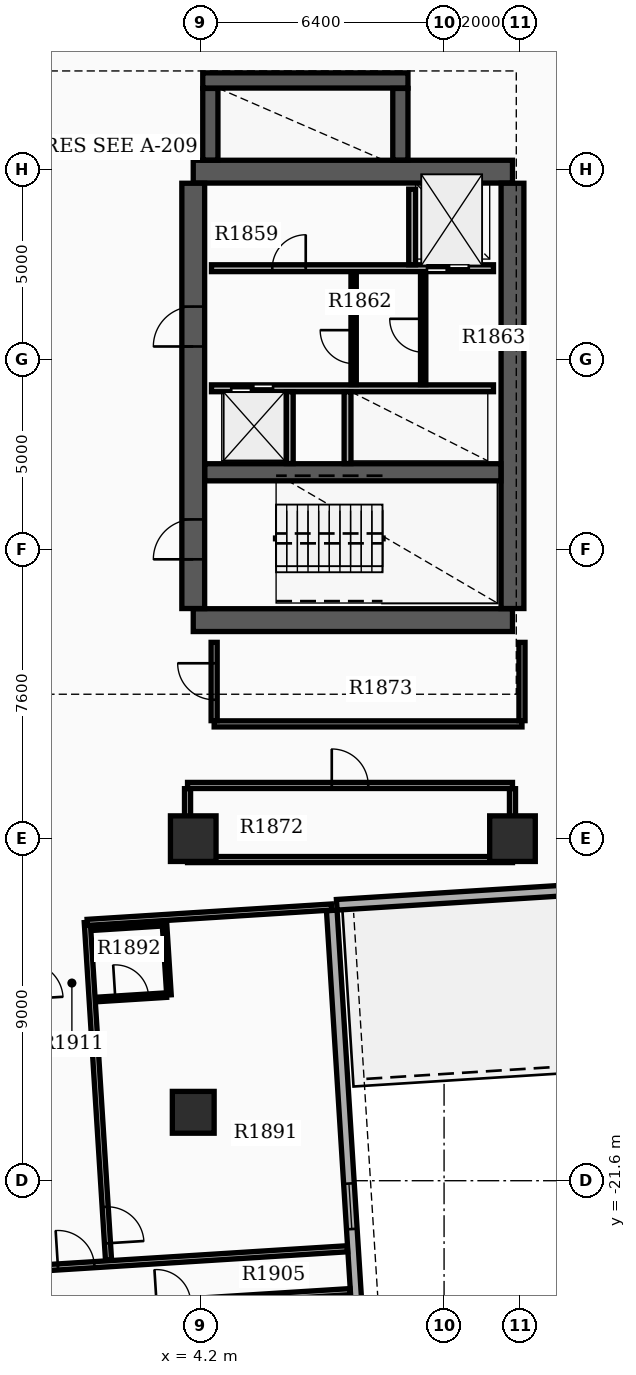
"""IFC4 building model, lengths in metres.
Left out: names, types, materials, properties, quantities, classifications, styles, units other than length and angle.
Written with IfcOpenShell. Run it as: python <this file> out.ifc"""

import sys

from ifc_helpers import new_model, si_unit, direction, frame, frame_2d, origin, origin_2d, place, context, subcontext, project, spatial, rectangle, extrude, element, fill, save


model = new_model("IFC4")
c1 = context("Model", 3, precision=1e-05, world=origin(), true_north=direction((0.0, 1.0)))
c2 = subcontext(c1, "Body", "Model", "MODEL_VIEW")
j1 = project(units=[si_unit("LENGTHUNIT", "METRE"), si_unit("PLANEANGLEUNIT", "RADIAN")], contexts=[c1])
p1 = place(None, origin())
s1 = spatial("IfcSite", under=j1, at=p1, CompositionType="ELEMENT")
p2 = place(p1, origin())
s2 = spatial("IfcBuilding", under=s1, at=p2, CompositionType="ELEMENT")
p3 = place(p2, frame((0.0, 0.0, 120.3)))
s3 = spatial("IfcBuildingStorey", under=s2, at=p3, CompositionType="ELEMENT", Elevation=120.3)
for number, where, z_axis, x_axis in (
    (1, (4.0, -6.85, 0.0), (0.0, 0.0, 1.0), (1.0, 0.0, 0.0)),
    (2, (4.0, 4.95, 0.0), (0.0, 0.0, 1.0), (1.0, 0.0, 0.0)),
):
    element("IfcWall", number, at=place(p3, frame(where, z_axis=z_axis, x_axis=x_axis)), inside=s3, PredefinedType="SHEAR", context=c2, shape_type="SweptSolid", body=[
        extrude(rectangle(XDim=8.4, YDim=0.6, at=frame_2d((4.2, 0.0))), origin(), (0.0, 0.0, 1.0), 3.7),
    ])
p4 = place(p3, frame((4.0, -6.545, 0.0), z_axis=(0.0, 0.0, 1.0), x_axis=(0.0, 1.0, 0.0)))
e3 = element("IfcWall", 3, at=p4, inside=s3, PredefinedType="SHEAR", context=c2, shape_type="SweptSolid", body=[
    extrude(rectangle(XDim=11.19, YDim=0.6, at=frame_2d((5.595, 0.0))), origin(), (0.0, 0.0, 1.0), 3.7),
])
p5 = place(p4, frame((1.295, 0.0, 0.0)))
e4 = element("IfcOpeningElement", 4, at=p5, cuts=e3, PredefinedType="OPENING", context=c2, shape_type="SweptSolid", body=[
    extrude(rectangle(XDim=1.05, YDim=2.15, at=frame_2d((0.525, 1.075))), frame((0.0, 0.31, 0.0), z_axis=(0.0, -1.0, 0.0), x_axis=(1.0, 0.0, 0.0)), (0.0, 0.0, 1.0), 0.62),
])
p6 = place(p4, frame((6.895, 0.0, 0.0)))
e5 = element("IfcOpeningElement", 5, at=p6, cuts=e3, PredefinedType="OPENING", context=c2, shape_type="SweptSolid", body=[
    extrude(rectangle(XDim=1.05, YDim=2.15, at=frame_2d((0.525, 1.075))), frame((0.0, 0.31, 0.0), z_axis=(0.0, -1.0, 0.0), x_axis=(1.0, 0.0, 0.0)), (0.0, 0.0, 1.0), 0.62),
])
p7 = place(p3, frame((12.4, -6.545, 0.0), z_axis=(0.0, 0.0, 1.0), x_axis=(0.0, 1.0, 0.0)))
e6 = element("IfcWall", 6, at=p7, inside=s3, PredefinedType="SHEAR", context=c2, shape_type="SweptSolid", body=[
    extrude(rectangle(XDim=11.19, YDim=0.6, at=frame_2d((5.595, 0.0))), origin(), (0.0, 0.0, 1.0), 3.7),
])
p8 = place(p3, frame((4.305, -2.96, 0.0), z_axis=(0.0, 0.0, 1.0), x_axis=(1.0, 0.0, 0.0)))
e7 = element("IfcWall", 7, at=p8, inside=s3, PredefinedType="SHEAR", context=c2, shape_type="SweptSolid", body=[
    extrude(rectangle(XDim=7.79, YDim=0.45, at=frame_2d((3.895, 0.0))), origin(), (0.0, 0.0, 1.0), 3.7),
])
p9 = place(p3, frame((4.45, 5.255, 0.0), z_axis=(0.0, 0.0, 1.0), x_axis=(0.0, 1.0, 0.0)))
e8 = element("IfcWall", 8, at=p9, inside=s3, PredefinedType="SHEAR", context=c2, shape_type="SweptSolid", body=[
    extrude(rectangle(XDim=1.885, YDim=0.4, at=frame_2d((0.942, 0.0))), origin(), (0.0, 0.0, 1.0), 3.7),
])
p10 = place(p3, frame((4.25, 7.35, 0.0), z_axis=(0.0, 0.0, 1.0), x_axis=(1.0, 0.0, 0.0)))
e9 = element("IfcWall", 9, at=p10, inside=s3, PredefinedType="SHEAR", context=c2, shape_type="SweptSolid", body=[
    extrude(rectangle(XDim=5.4, YDim=0.4, at=frame_2d((2.7, 0.0))), origin(), (0.0, 0.0, 1.0), 3.7),
])
p11 = place(p3, frame((9.45, 5.255, 0.0), z_axis=(0.0, 0.0, 1.0), x_axis=(0.0, 1.0, 0.0)))
e10 = element("IfcWall", 10, at=p11, inside=s3, PredefinedType="SHEAR", context=c2, shape_type="SweptSolid", body=[
    extrude(rectangle(XDim=1.885, YDim=0.4, at=frame_2d((0.942, 0.0))), origin(), (0.0, 0.0, 1.0), 3.7),
])
for number, where, z_axis, x_axis in (
    (11, (12.4, -12.6, 0.0), (0.0, 0.0, 1.0), (1.0, 0.0, 0.0)),
    (12, (4.0, -12.6, 0.0), (0.0, 0.0, 1.0), (1.0, 0.0, 0.0)),
):
    element("IfcColumn", number, at=place(p3, frame(where, z_axis=z_axis, x_axis=x_axis)), inside=s3, PredefinedType="COLUMN", context=c2, shape_type="SweptSolid", body=[
        extrude(rectangle(XDim=1.2, YDim=1.2, at=origin_2d()), origin(), (0.0, 0.0, 1.0), 3.9),
    ])
p12 = place(p3, frame((4.0, -19.8, 0.0), z_axis=(0.0, 0.0, 1.0), x_axis=(1.0, 0.0, 0.0)))
e13 = element("IfcColumn", 13, at=p12, inside=s3, PredefinedType="COLUMN", context=c2, shape_type="SweptSolid", body=[
    extrude(rectangle(XDim=1.1, YDim=1.1, at=origin_2d()), origin(), (0.0, 0.0, 1.0), 3.9),
])
p13 = place(p3, frame((8.907, -34.549, 0.0), z_axis=(0.0, 0.0, 1.0), x_axis=(-0.06279645424, 0.99802635503, 0.0)))
e14 = element("IfcWall", 14, at=p13, inside=s3, PredefinedType="STANDARD", context=c2, shape_type="SweptSolid", body=[
    extrude(rectangle(XDim=20.1, YDim=0.28, at=frame_2d((10.05, 0.0))), origin(), (0.0, 0.0, 1.0), 2.97),
])
p14 = place(p13, frame((0.85, 0.0, 0.8)))
e15 = element("IfcOpeningElement", 15, at=p14, cuts=e14, PredefinedType="OPENING", context=c2, shape_type="SweptSolid", body=[
    extrude(rectangle(XDim=1.2, YDim=1.6, at=frame_2d((0.6, 0.8))), frame((0.0, 0.15, 0.0), z_axis=(0.0, -1.0, 0.0), x_axis=(1.0, 0.0, 0.0)), (0.0, 0.0, 1.0), 0.3),
])
p15 = place(p13, frame((4.05, 0.0, 0.8)))
e16 = element("IfcOpeningElement", 16, at=p15, cuts=e14, PredefinedType="OPENING", context=c2, shape_type="SweptSolid", body=[
    extrude(rectangle(XDim=1.2, YDim=1.6, at=frame_2d((0.6, 0.8))), frame((0.0, 0.15, 0.0), z_axis=(0.0, -1.0, 0.0), x_axis=(1.0, 0.0, 0.0)), (0.0, 0.0, 1.0), 0.3),
])
p16 = place(p13, frame((7.25, 0.0, 0.8)))
e17 = element("IfcOpeningElement", 17, at=p16, cuts=e14, PredefinedType="OPENING", context=c2, shape_type="SweptSolid", body=[
    extrude(rectangle(XDim=1.2, YDim=1.6, at=frame_2d((0.6, 0.8))), frame((0.0, 0.15, 0.0), z_axis=(0.0, -1.0, 0.0), x_axis=(1.0, 0.0, 0.0)), (0.0, 0.0, 1.0), 0.3),
])
p17 = place(p13, frame((11.7, 0.0, 0.8)))
e18 = element("IfcOpeningElement", 18, at=p17, cuts=e14, PredefinedType="OPENING", context=c2, shape_type="SweptSolid", body=[
    extrude(rectangle(XDim=1.2, YDim=1.6, at=frame_2d((0.6, 0.8))), frame((0.0, 0.15, 0.0), z_axis=(0.0, -1.0, 0.0), x_axis=(1.0, 0.0, 0.0)), (0.0, 0.0, 1.0), 0.3),
])
p18 = place(p3, frame((14.063, -13.945, 0.0), z_axis=(0.0, 0.0, 1.0), x_axis=(-0.998027314704, -0.062781200242, 0.0)))
e19 = element("IfcWall", 19, at=p18, inside=s3, PredefinedType="STANDARD", context=c2, shape_type="SweptSolid", body=[
    extrude(rectangle(XDim=6.3, YDim=0.28, at=frame_2d((3.15, 0.0))), origin(), (0.0, 0.0, 1.0), 2.97),
])
p19 = place(p3, frame((4.48, 2.41, 0.0), z_axis=(0.0, 0.0, 1.0), x_axis=(1.0, 0.0, 0.0)))
e20 = element("IfcWall", 20, at=p19, inside=s3, PredefinedType="SOLIDWALL", context=c2, shape_type="SweptSolid", body=[
    extrude(rectangle(XDim=7.42, YDim=0.18, at=frame_2d((3.71, 0.0))), origin(), (0.0, 0.0, 1.0), 2.96),
])
p20 = place(p19, frame((5.67, 0.0, 0.0)))
e21 = element("IfcOpeningElement", 21, at=p20, cuts=e20, PredefinedType="OPENING", context=c2, shape_type="SweptSolid", body=[
    extrude(rectangle(XDim=1.1, YDim=2.15, at=frame_2d((0.55, 1.075))), frame((0.0, 0.1, 0.0), z_axis=(0.0, -1.0, 0.0), x_axis=(1.0, 0.0, 0.0)), (0.0, 0.0, 1.0), 0.2),
])
p21 = place(p19, frame((1.6, 0.0, 0.0)))
e22 = element("IfcOpeningElement", 22, at=p21, cuts=e20, PredefinedType="OPENING", context=c2, shape_type="SweptSolid", body=[
    extrude(rectangle(XDim=0.88, YDim=2.1, at=frame_2d((0.44, 1.05))), frame((0.0, 0.1, 0.0), z_axis=(0.0, -1.0, 0.0), x_axis=(1.0, 0.0, 0.0)), (0.0, 0.0, 1.0), 0.2),
])
p22 = place(p3, frame((4.48, -0.75, 0.0), z_axis=(0.0, 0.0, 1.0), x_axis=(1.0, 0.0, 0.0)))
e23 = element("IfcWall", 23, at=p22, inside=s3, PredefinedType="SOLIDWALL", context=c2, shape_type="SweptSolid", body=[
    extrude(rectangle(XDim=7.42, YDim=0.18, at=frame_2d((3.71, 0.0))), origin(), (0.0, 0.0, 1.0), 2.96),
])
p23 = place(p22, frame((0.52, 0.0, 0.0)))
e24 = element("IfcOpeningElement", 24, at=p23, cuts=e23, PredefinedType="OPENING", context=c2, shape_type="SweptSolid", body=[
    extrude(rectangle(XDim=1.1, YDim=2.15, at=frame_2d((0.55, 1.075))), frame((0.0, 0.1, 0.0), z_axis=(0.0, -1.0, 0.0), x_axis=(1.0, 0.0, 0.0)), (0.0, 0.0, 1.0), 0.2),
])
p24 = place(p3, frame((9.76, 2.5, 0.0), z_axis=(0.0, 0.0, 1.0), x_axis=(0.0, 1.0, 0.0)))
e25 = element("IfcWall", 25, at=p24, inside=s3, PredefinedType="SOLIDWALL", context=c2, shape_type="SweptSolid", body=[
    extrude(rectangle(XDim=1.99, YDim=0.18, at=frame_2d((0.995, 0.0))), origin(), (0.0, 0.0, 1.0), 2.96),
])
for number, where, z_axis, x_axis in (
    (26, (6.54, -2.73, 0.0), (0.0, 0.0, 1.0), (0.0, 1.0, 0.0)),
    (27, (8.06, -2.73, 0.0), (0.0, 0.0, 1.0), (0.0, 1.0, 0.0)),
):
    element("IfcWall", number, at=place(p3, frame(where, z_axis=z_axis, x_axis=x_axis)), inside=s3, PredefinedType="SOLIDWALL", context=c2, shape_type="SweptSolid", body=[
        extrude(rectangle(XDim=1.89, YDim=0.18, at=frame_2d((0.945, 0.0))), origin(), (0.0, 0.0, 1.0), 2.96),
    ])
p25 = place(p3, frame((8.22, -0.65, 0.0), z_axis=(0.0, 0.0, 1.0), x_axis=(0.0, 1.0, 0.0)))
e28 = element("IfcWall", 28, at=p25, inside=s3, PredefinedType="SOLIDWALL", context=c2, shape_type="SweptSolid", body=[
    extrude(rectangle(XDim=2.96, YDim=0.14, at=frame_2d((1.48, 0.0))), origin(), (0.0, 0.0, 1.0), 2.96),
])
p26 = place(p25, frame((0.55, 0.0, 0.0)))
e29 = element("IfcOpeningElement", 29, at=p26, cuts=e28, PredefinedType="OPENING", context=c2, shape_type="SweptSolid", body=[
    extrude(rectangle(XDim=0.88, YDim=2.1, at=frame_2d((0.44, 1.05))), frame((0.0, 0.08, 0.0), z_axis=(0.0, -1.0, 0.0), x_axis=(1.0, 0.0, 0.0)), (0.0, 0.0, 1.0), 0.16),
])
p27 = place(p3, frame((10.05, -0.652, 0.0), z_axis=(0.0, 0.0, 1.0), x_axis=(0.0, 1.0, 0.0)))
e30 = element("IfcWall", 30, at=p27, inside=s3, PredefinedType="PARTITIONING", context=c2, shape_type="SweptSolid", body=[
    extrude(rectangle(XDim=2.962, YDim=0.14, at=frame_2d((1.481, 0.0))), origin(), (0.0, 0.0, 1.0), 2.96),
])
p28 = place(p27, frame((0.85, 0.0, 0.0)))
e31 = element("IfcOpeningElement", 31, at=p28, cuts=e30, PredefinedType="OPENING", context=c2, shape_type="SweptSolid", body=[
    extrude(rectangle(XDim=0.88, YDim=2.1, at=frame_2d((0.44, 1.05))), frame((0.0, 0.08, 0.0), z_axis=(0.0, -1.0, 0.0), x_axis=(1.0, 0.0, 0.0)), (0.0, 0.0, 1.0), 0.16),
])
p29 = place(p3, frame((3.85, -13.15, 0.0), z_axis=(0.0, 0.0, 1.0), x_axis=(1.0, 0.0, 0.0)))
e32 = element("IfcWall", 32, at=p29, inside=s3, PredefinedType="PARTITIONING", context=c2, shape_type="SweptSolid", body=[
    extrude(rectangle(XDim=8.55, YDim=0.16, at=frame_2d((4.275, 0.0))), origin(), (0.0, 0.0, 1.0), 2.96),
])
p30 = place(p3, frame((3.85, -11.2, 0.0), z_axis=(0.0, 0.0, 1.0), x_axis=(1.0, 0.0, 0.0)))
e33 = element("IfcWall", 33, at=p30, inside=s3, PredefinedType="PARTITIONING", context=c2, shape_type="SweptSolid", body=[
    extrude(rectangle(XDim=8.55, YDim=0.16, at=frame_2d((4.275, 0.0))), origin(), (0.0, 0.0, 1.0), 2.96),
])
p31 = place(p30, frame((3.795, 0.0, 0.0)))
e34 = element("IfcOpeningElement", 34, at=p31, cuts=e33, PredefinedType="OPENING", context=c2, shape_type="SweptSolid", body=[
    extrude(rectangle(XDim=0.96, YDim=2.15, at=frame_2d((0.48, 1.075))), frame((0.0, 0.09, 0.0), z_axis=(0.0, -1.0, 0.0), x_axis=(1.0, 0.0, 0.0)), (0.0, 0.0, 1.0), 0.18),
])
for number, where, z_axis, x_axis in (
    (35, (3.85, -13.065, 0.0), (0.0, 0.0, 1.0), (0.0, 1.0, 0.0)),
    (36, (12.4, -13.065, 0.0), (0.0, 0.0, 1.0), (0.0, 1.0, 0.0)),
):
    element("IfcWall", number, at=place(p3, frame(where, z_axis=z_axis, x_axis=x_axis)), inside=s3, PredefinedType="PARTITIONING", context=c2, shape_type="SweptSolid", body=[
        extrude(rectangle(XDim=1.78, YDim=0.16, at=frame_2d((0.89, 0.0))), origin(), (0.0, 0.0, 1.0), 2.96),
    ])
p32 = place(p3, frame((4.55, -9.58, 0.0), z_axis=(0.0, 0.0, 1.0), x_axis=(1.0, 0.0, 0.0)))
e37 = element("IfcWall", 37, at=p32, inside=s3, PredefinedType="PARTITIONING", context=c2, shape_type="SweptSolid", body=[
    extrude(rectangle(XDim=8.1, YDim=0.16, at=frame_2d((4.05, 0.0))), origin(), (0.0, 0.0, 1.0), 2.96),
])
p33 = place(p3, frame((4.55, -9.495, 0.0), z_axis=(0.0, 0.0, 1.0), x_axis=(0.0, 1.0, 0.0)))
e38 = element("IfcWall", 38, at=p33, inside=s3, PredefinedType="PARTITIONING", context=c2, shape_type="SweptSolid", body=[
    extrude(rectangle(XDim=2.06, YDim=0.16, at=frame_2d((1.03, 0.0))), origin(), (0.0, 0.0, 1.0), 2.96),
])
p34 = place(p33, frame((0.55, 0.0, 0.0)))
e39 = element("IfcOpeningElement", 39, at=p34, cuts=e38, PredefinedType="OPENING", context=c2, shape_type="SweptSolid", body=[
    extrude(rectangle(XDim=0.96, YDim=2.15, at=frame_2d((0.48, 1.075))), frame((0.0, 0.09, 0.0), z_axis=(0.0, -1.0, 0.0), x_axis=(1.0, 0.0, 0.0)), (0.0, 0.0, 1.0), 0.18),
])
p35 = place(p3, frame((12.65, -9.495, 0.0), z_axis=(0.0, 0.0, 1.0), x_axis=(0.0, 1.0, 0.0)))
e40 = element("IfcWall", 40, at=p35, inside=s3, PredefinedType="PARTITIONING", context=c2, shape_type="SweptSolid", body=[
    extrude(rectangle(XDim=2.06, YDim=0.16, at=frame_2d((1.03, 0.0))), origin(), (0.0, 0.0, 1.0), 2.96),
])
p36 = place(p3, frame((1.212, -14.803, 0.0), z_axis=(0.0, 0.0, 1.0), x_axis=(0.062789854524, -0.998026770267, 0.0)))
e41 = element("IfcWall", 41, at=p36, inside=s3, PredefinedType="PARTITIONING", context=c2, shape_type="SweptSolid", body=[
    extrude(rectangle(XDim=8.9, YDim=0.16, at=frame_2d((4.45, 0.0))), origin(), (0.0, 0.0, 1.0), 2.96),
])
p37 = place(p36, frame((7.5, 0.0, 0.0)))
e42 = element("IfcOpeningElement", 42, at=p37, cuts=e41, PredefinedType="OPENING", context=c2, shape_type="SweptSolid", body=[
    extrude(rectangle(XDim=0.96, YDim=2.15, at=frame_2d((0.48, 1.075))), frame((0.0, 0.09, 0.0), z_axis=(0.0, -1.0, 0.0), x_axis=(1.0, 0.0, 0.0)), (0.0, 0.0, 1.0), 0.18),
])
p38 = place(p3, frame((1.212, -14.803, 0.0), z_axis=(0.0, 0.0, 1.0), x_axis=(0.998027420959, 0.062779511096, 0.0)))
e43 = element("IfcWall", 43, at=p38, inside=s3, PredefinedType="PARTITIONING", context=c2, shape_type="SweptSolid", body=[
    extrude(rectangle(XDim=6.44, YDim=0.16, at=frame_2d((3.22, 0.0))), origin(), (0.0, 0.0, 1.0), 2.96),
])
p39 = place(p3, frame((1.48, -16.83, 0.0), z_axis=(0.0, 0.0, 1.0), x_axis=(0.998027443946, 0.062779145668, 0.0)))
e44 = element("IfcWall", 44, at=p39, inside=s3, PredefinedType="PARTITIONING", context=c2, shape_type="SweptSolid", body=[
    extrude(rectangle(XDim=1.82, YDim=0.12, at=frame_2d((0.91, 0.0))), origin(), (0.0, 0.0, 1.0), 2.96),
])
p40 = place(p39, frame((0.47, 0.0, 0.0)))
e45 = element("IfcOpeningElement", 45, at=p40, cuts=e44, PredefinedType="OPENING", context=c2, shape_type="SweptSolid", body=[
    extrude(rectangle(XDim=0.88, YDim=2.1, at=frame_2d((0.44, 1.05))), frame((0.0, 0.07, 0.0), z_axis=(0.0, -1.0, 0.0), x_axis=(1.0, 0.0, 0.0)), (0.0, 0.0, 1.0), 0.14),
])
p41 = place(p3, frame((1.362, -14.954, 0.0), z_axis=(0.0, 0.0, 1.0), x_axis=(0.998018499228, 0.062921182436, 0.0)))
e46 = element("IfcWall", 46, at=p41, inside=s3, PredefinedType="PARTITIONING", context=c2, shape_type="SweptSolid", body=[
    extrude(rectangle(XDim=1.82, YDim=0.12, at=frame_2d((0.91, 0.0))), origin(), (0.0, 0.0, 1.0), 2.96),
])
p42 = place(p3, frame((3.243, -14.836, 0.0), z_axis=(0.0, 0.0, 1.0), x_axis=(0.062855297722, -0.998022650819, 0.0)))
e47 = element("IfcWall", 47, at=p42, inside=s3, PredefinedType="PARTITIONING", context=c2, shape_type="SweptSolid", body=[
    extrude(rectangle(XDim=1.88, YDim=0.12, at=frame_2d((0.94, 0.0))), origin(), (0.0, 0.0, 1.0), 2.96),
])
p43 = place(p3, frame((-5.062, -24.216, 0.0), z_axis=(0.0, 0.0, 1.0), x_axis=(0.998027273128, 0.062781861182, 0.0)))
e48 = element("IfcWall", 48, at=p43, inside=s3, PredefinedType="PARTITIONING", context=c2, shape_type="SweptSolid", body=[
    extrude(rectangle(XDim=13.144, YDim=0.16, at=frame_2d((6.572, 0.0))), origin(), (0.0, 0.0, 1.0), 2.96),
])
p44 = place(p43, frame((5.512, 0.0, 0.0)))
e49 = element("IfcOpeningElement", 49, at=p44, cuts=e48, PredefinedType="OPENING", context=c2, shape_type="SweptSolid", body=[
    extrude(rectangle(XDim=0.96, YDim=2.15, at=frame_2d((0.48, 1.075))), frame((0.0, 0.09, 0.0), z_axis=(0.0, -1.0, 0.0), x_axis=(1.0, 0.0, 0.0)), (0.0, 0.0, 1.0), 0.18),
])
p45 = place(p3, frame((-4.99, -25.344, 0.0), z_axis=(0.0, 0.0, 1.0), x_axis=(0.998026109115, 0.062800362452, 0.0)))
e50 = element("IfcWall", 50, at=p45, inside=s3, PredefinedType="PARTITIONING", context=c2, shape_type="SweptSolid", body=[
    extrude(rectangle(XDim=13.144, YDim=0.16, at=frame_2d((6.572, 0.0))), origin(), (0.0, 0.0, 1.0), 2.96),
])
p46 = place(p45, frame((4.202, 0.0, 0.0)))
e51 = element("IfcOpeningElement", 51, at=p46, cuts=e50, PredefinedType="OPENING", context=c2, shape_type="SweptSolid", body=[
    extrude(rectangle(XDim=0.9, YDim=2.15, at=frame_2d((0.45, 1.075))), frame((0.0, 0.09, 0.0), z_axis=(0.0, -1.0, 0.0), x_axis=(1.0, 0.0, 0.0)), (0.0, 0.0, 1.0), 0.18),
])
p47 = place(p45, frame((8.042, 0.0, 0.0)))
e52 = element("IfcOpeningElement", 52, at=p47, cuts=e50, PredefinedType="OPENING", context=c2, shape_type="SweptSolid", body=[
    extrude(rectangle(XDim=0.9, YDim=2.15, at=frame_2d((0.45, 1.075))), frame((0.0, 0.09, 0.0), z_axis=(0.0, -1.0, 0.0), x_axis=(1.0, 0.0, 0.0)), (0.0, 0.0, 1.0), 0.18),
])
p48 = place(p17, origin())
e53 = element("IfcWindow", 53, at=p48, inside=s3, PartitioningType="SINGLE_PANEL", PredefinedType="WINDOW", context=c2, shape_type="SweptSolid", body=[
    extrude(rectangle(XDim=1.2, YDim=1.6, at=frame_2d((0.6, 0.8))), frame((0.0, 0.03, 0.0), z_axis=(0.0, -1.0, 0.0), x_axis=(1.0, 0.0, 0.0)), (0.0, 0.0, 1.0), 0.06),
])
fill(e18, e53)
p49 = place(p5, origin())
e54 = element("IfcDoor", 54, at=p49, inside=s3, OperationType="SINGLE_SWING_LEFT", PredefinedType="DOOR", context=c2, shape_type="SweptSolid", body=[
    extrude(rectangle(XDim=1.05, YDim=2.15, at=frame_2d((0.525, 1.075))), frame((0.0, 0.025, 0.0), z_axis=(0.0, -1.0, 0.0), x_axis=(1.0, 0.0, 0.0)), (0.0, 0.0, 1.0), 0.05),
])
fill(e4, e54)
p50 = place(p6, origin())
e55 = element("IfcDoor", 55, at=p50, inside=s3, OperationType="SINGLE_SWING_LEFT", PredefinedType="DOOR", context=c2, shape_type="SweptSolid", body=[
    extrude(rectangle(XDim=1.05, YDim=2.15, at=frame_2d((0.525, 1.075))), frame((0.0, 0.025, 0.0), z_axis=(0.0, -1.0, 0.0), x_axis=(1.0, 0.0, 0.0)), (0.0, 0.0, 1.0), 0.05),
])
fill(e5, e55)
p51 = place(p20, origin())
e56 = element("IfcDoor", 56, at=p51, inside=s3, OperationType="DOUBLE_DOOR_SLIDING", PredefinedType="DOOR", context=c2, shape_type="SweptSolid", body=[
    extrude(rectangle(XDim=1.1, YDim=2.15, at=frame_2d((0.55, 1.075))), frame((0.0, 0.025, 0.0), z_axis=(0.0, -1.0, 0.0), x_axis=(1.0, 0.0, 0.0)), (0.0, 0.0, 1.0), 0.05),
])
fill(e21, e56)
p52 = place(p23, origin())
e57 = element("IfcDoor", 57, at=p52, inside=s3, OperationType="DOUBLE_DOOR_SLIDING", PredefinedType="DOOR", context=c2, shape_type="SweptSolid", body=[
    extrude(rectangle(XDim=1.1, YDim=2.15, at=frame_2d((0.55, 1.075))), frame((0.0, 0.025, 0.0), z_axis=(0.0, -1.0, 0.0), x_axis=(1.0, 0.0, 0.0)), (0.0, 0.0, 1.0), 0.05),
])
fill(e24, e57)
p53 = place(p21, origin())
e58 = element("IfcDoor", 58, at=p53, inside=s3, OperationType="SINGLE_SWING_RIGHT", PredefinedType="DOOR", context=c2, shape_type="SweptSolid", body=[
    extrude(rectangle(XDim=0.88, YDim=2.1, at=frame_2d((0.44, 1.05))), frame((0.0, 0.025, 0.0), z_axis=(0.0, -1.0, 0.0), x_axis=(1.0, 0.0, 0.0)), (0.0, 0.0, 1.0), 0.05),
])
fill(e22, e58)
p54 = place(p26, origin())
e59 = element("IfcDoor", 59, at=p54, inside=s3, OperationType="SINGLE_SWING_RIGHT", PredefinedType="DOOR", context=c2, shape_type="SweptSolid", body=[
    extrude(rectangle(XDim=0.88, YDim=2.1, at=frame_2d((0.44, 1.05))), frame((0.0, 0.025, 0.0), z_axis=(0.0, -1.0, 0.0), x_axis=(1.0, 0.0, 0.0)), (0.0, 0.0, 1.0), 0.05),
])
fill(e29, e59)
p55 = place(p28, origin())
e60 = element("IfcDoor", 60, at=p55, inside=s3, OperationType="SINGLE_SWING_RIGHT", PredefinedType="DOOR", context=c2, shape_type="SweptSolid", body=[
    extrude(rectangle(XDim=0.88, YDim=2.1, at=frame_2d((0.44, 1.05))), frame((0.0, 0.025, 0.0), z_axis=(0.0, -1.0, 0.0), x_axis=(1.0, 0.0, 0.0)), (0.0, 0.0, 1.0), 0.05),
])
fill(e31, e60)
p56 = place(p31, origin())
e61 = element("IfcDoor", 61, at=p56, inside=s3, OperationType="SINGLE_SWING_LEFT", PredefinedType="DOOR", context=c2, shape_type="SweptSolid", body=[
    extrude(rectangle(XDim=0.96, YDim=2.15, at=frame_2d((0.48, 1.075))), frame((0.0, 0.025, 0.0), z_axis=(0.0, -1.0, 0.0), x_axis=(1.0, 0.0, 0.0)), (0.0, 0.0, 1.0), 0.05),
])
fill(e34, e61)
p57 = place(p34, origin())
e62 = element("IfcDoor", 62, at=p57, inside=s3, OperationType="SINGLE_SWING_RIGHT", PredefinedType="DOOR", context=c2, shape_type="SweptSolid", body=[
    extrude(rectangle(XDim=0.96, YDim=2.15, at=frame_2d((0.48, 1.075))), frame((0.0, 0.025, 0.0), z_axis=(0.0, -1.0, 0.0), x_axis=(1.0, 0.0, 0.0)), (0.0, 0.0, 1.0), 0.05),
])
fill(e39, e62)
p58 = place(p37, origin())
e63 = element("IfcDoor", 63, at=p58, inside=s3, OperationType="SINGLE_SWING_RIGHT", PredefinedType="DOOR", context=c2, shape_type="SweptSolid", body=[
    extrude(rectangle(XDim=0.96, YDim=2.15, at=frame_2d((0.48, 1.075))), frame((0.0, 0.025, 0.0), z_axis=(0.0, -1.0, 0.0), x_axis=(1.0, 0.0, 0.0)), (0.0, 0.0, 1.0), 0.05),
])
fill(e42, e63)
p59 = place(p40, origin())
e64 = element("IfcDoor", 64, at=p59, inside=s3, OperationType="SINGLE_SWING_LEFT", PredefinedType="DOOR", context=c2, shape_type="SweptSolid", body=[
    extrude(rectangle(XDim=0.88, YDim=2.1, at=frame_2d((0.44, 1.05))), frame((0.0, 0.025, 0.0), z_axis=(0.0, -1.0, 0.0), x_axis=(1.0, 0.0, 0.0)), (0.0, 0.0, 1.0), 0.05),
])
fill(e45, e64)
p60 = place(p44, origin())
e65 = element("IfcDoor", 65, at=p60, inside=s3, OperationType="SINGLE_SWING_LEFT", PredefinedType="DOOR", context=c2, shape_type="SweptSolid", body=[
    extrude(rectangle(XDim=0.96, YDim=2.15, at=frame_2d((0.48, 1.075))), frame((0.0, 0.025, 0.0), z_axis=(0.0, -1.0, 0.0), x_axis=(1.0, 0.0, 0.0)), (0.0, 0.0, 1.0), 0.05),
])
fill(e49, e65)
save(model, sys.argv[1])
